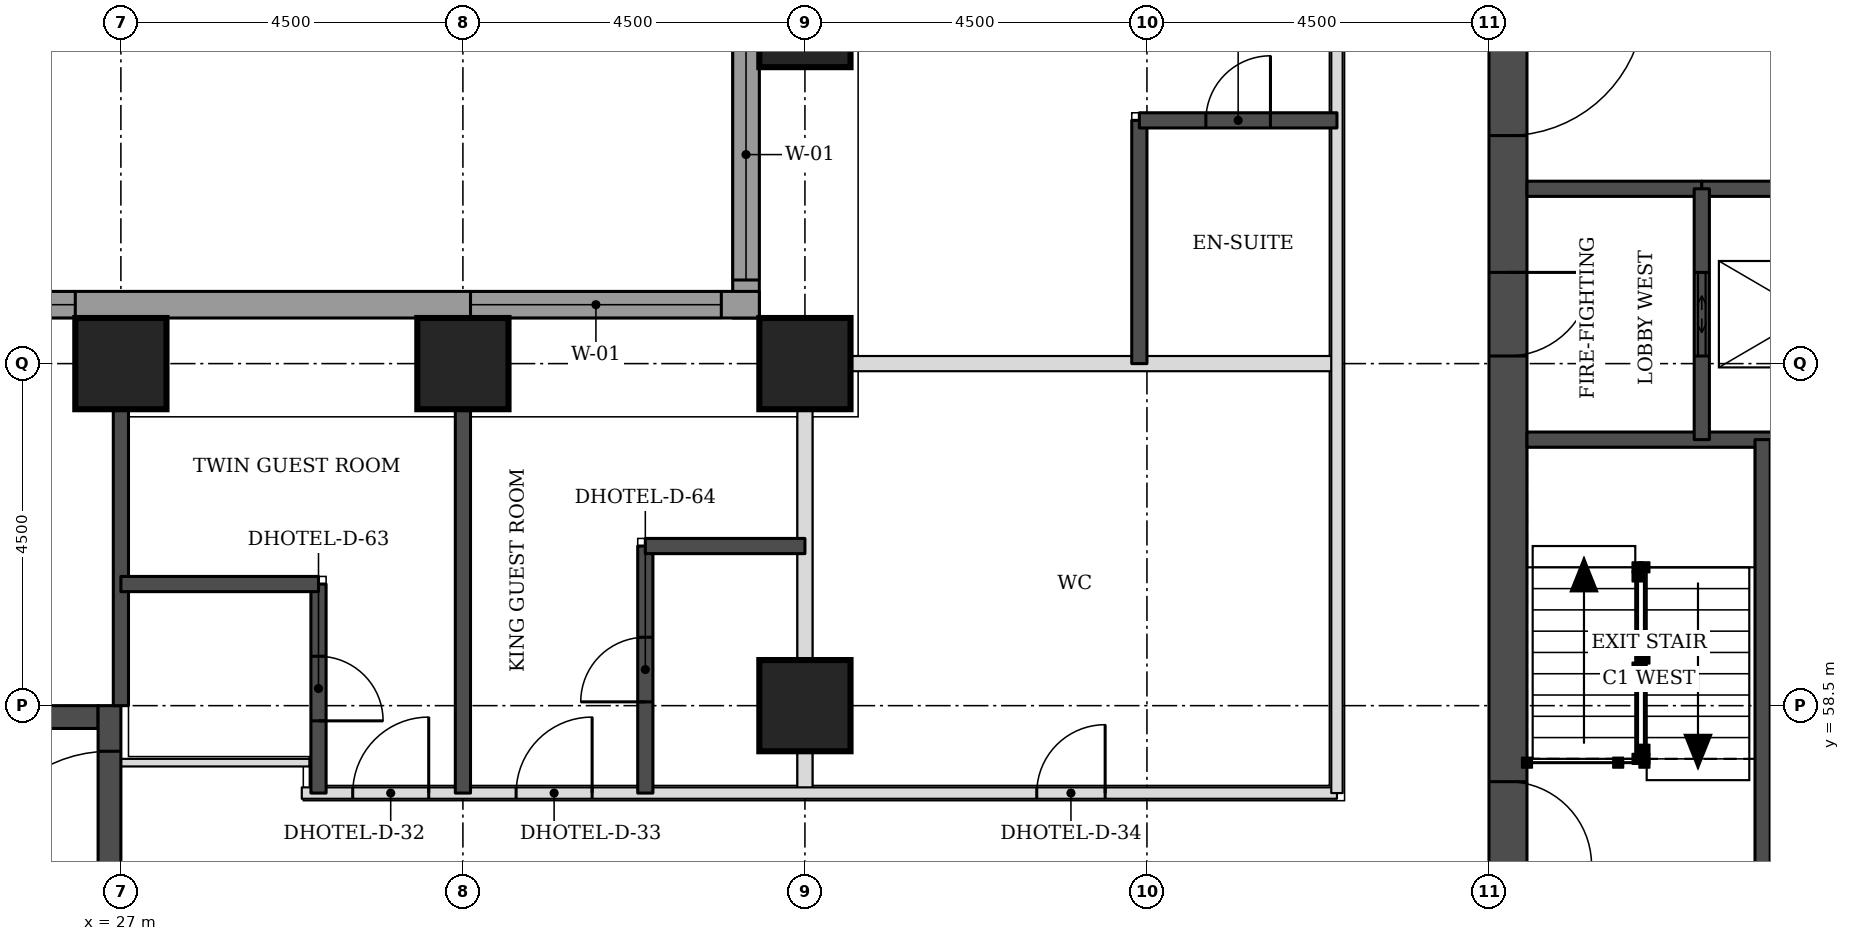
"""IFC4 building model, lengths in metres.
Left out: names, types, materials, properties, quantities, classifications, styles, units other than length and angle.
Written with IfcOpenShell. Run it as: python <this file> out.ifc"""

import sys

from ifc_helpers import new_model, si_unit, direction, frame, frame_2d, origin, origin_2d, place, context, subcontext, project, spatial, rectangle, extrude, element, fill, save


model = new_model("IFC4")
c1 = context("Model", 3, precision=1e-05, world=origin(), true_north=direction((0.0, 1.0)))
c2 = subcontext(c1, "Body", "Model", "MODEL_VIEW")
j1 = project(units=[si_unit("LENGTHUNIT", "METRE"), si_unit("PLANEANGLEUNIT", "RADIAN")], contexts=[c1])
p1 = place(None, origin())
s1 = spatial("IfcSite", under=j1, at=p1, CompositionType="ELEMENT")
p2 = place(p1, origin())
s2 = spatial("IfcBuilding", under=s1, at=p2, CompositionType="ELEMENT")
p3 = place(p2, frame((0.0, 0.0, 36.3)))
s3 = spatial("IfcBuildingStorey", under=s2, at=p3, CompositionType="ELEMENT", Elevation=36.3)
for number, where, z_axis, x_axis in (
    (1, (36.0, 58.5, 0.0), (0.0, 0.0, 1.0), (1.0, 0.0, 0.0)),
    (2, (27.0, 63.0, 0.0), (0.0, 0.0, 1.0), (1.0, 0.0, 0.0)),
    (3, (31.5, 63.0, 0.0), (0.0, 0.0, 1.0), (1.0, 0.0, 0.0)),
    (4, (36.0, 63.0, 0.0), (0.0, 0.0, 1.0), (1.0, 0.0, 0.0)),
    (5, (36.0, 67.5, 0.0), (0.0, 0.0, 1.0), (1.0, 0.0, 0.0)),
):
    element("IfcColumn", number, at=place(p3, frame(where, z_axis=z_axis, x_axis=x_axis)), inside=s3, PredefinedType="COLUMN", context=c2, shape_type="SweptSolid", body=[
        extrude(rectangle(XDim=1.2, YDim=1.2, at=origin_2d()), origin(), (0.0, 0.0, 1.0), 3.3),
    ])
p4 = place(p3, frame((45.25, 49.5, 0.0), z_axis=(0.0, 0.0, 1.0), x_axis=(0.0, 1.0, 0.0)))
e6 = element("IfcWall", 6, at=p4, inside=s3, PredefinedType="SHEAR", context=c2, shape_type="SweptSolid", body=[
    extrude(rectangle(XDim=22.5, YDim=0.5, at=frame_2d((11.25, 0.0))), origin(), (0.0, 0.0, 1.0), 3.3),
])
p5 = place(p4, frame((4.2, 0.0, 0.0)))
e7 = element("IfcOpeningElement", 7, at=p5, cuts=e6, PredefinedType="OPENING", context=c2, shape_type="SweptSolid", body=[
    extrude(rectangle(XDim=1.8, YDim=2.1, at=frame_2d((0.9, 1.05))), frame((0.0, 0.26, 0.0), z_axis=(0.0, -1.0, 0.0), x_axis=(1.0, 0.0, 0.0)), (0.0, 0.0, 1.0), 0.52),
])
p6 = place(p4, frame((6.9, 0.0, 0.0)))
e8 = element("IfcOpeningElement", 8, at=p6, cuts=e6, PredefinedType="OPENING", context=c2, shape_type="SweptSolid", body=[
    extrude(rectangle(XDim=1.1, YDim=2.1, at=frame_2d((0.55, 1.05))), frame((0.0, 0.26, 0.0), z_axis=(0.0, -1.0, 0.0), x_axis=(1.0, 0.0, 0.0)), (0.0, 0.0, 1.0), 0.52),
])
p7 = place(p4, frame((13.6, 0.0, 0.0)))
e9 = element("IfcOpeningElement", 9, at=p7, cuts=e6, PredefinedType="OPENING", context=c2, shape_type="SweptSolid", body=[
    extrude(rectangle(XDim=1.1, YDim=2.1, at=frame_2d((0.55, 1.05))), frame((0.0, 0.26, 0.0), z_axis=(0.0, -1.0, 0.0), x_axis=(1.0, 0.0, 0.0)), (0.0, 0.0, 1.0), 0.52),
])
p8 = place(p4, frame((16.5, 0.0, 0.0)))
e10 = element("IfcOpeningElement", 10, at=p8, cuts=e6, PredefinedType="OPENING", context=c2, shape_type="SweptSolid", body=[
    extrude(rectangle(XDim=1.8, YDim=2.1, at=frame_2d((0.9, 1.05))), frame((0.0, 0.26, 0.0), z_axis=(0.0, -1.0, 0.0), x_axis=(1.0, 0.0, 0.0)), (0.0, 0.0, 1.0), 0.52),
])
p9 = place(p3, frame((18.3, 58.35, 0.0), z_axis=(0.0, 0.0, 1.0), x_axis=(1.0, 0.0, 0.0)))
e11 = element("IfcWall", 11, at=p9, inside=s3, PredefinedType="SHEAR", context=c2, shape_type="SweptSolid", body=[
    extrude(rectangle(XDim=8.4, YDim=0.3, at=frame_2d((4.2, 0.0))), origin(), (0.0, 0.0, 1.0), 3.3),
])
p10 = place(p3, frame((26.85, 49.5, 0.0), z_axis=(0.0, 0.0, 1.0), x_axis=(0.0, 1.0, 0.0)))
e12 = element("IfcWall", 12, at=p10, inside=s3, PredefinedType="SHEAR", context=c2, shape_type="SweptSolid", body=[
    extrude(rectangle(XDim=9.0, YDim=0.3, at=frame_2d((4.5, 0.0))), origin(), (0.0, 0.0, 1.0), 3.3),
])
p11 = place(p10, frame((6.6, 0.0, 0.0)))
e13 = element("IfcOpeningElement", 13, at=p11, cuts=e12, PredefinedType="OPENING", context=c2, shape_type="SweptSolid", body=[
    extrude(rectangle(XDim=1.8, YDim=2.1, at=frame_2d((0.9, 1.05))), frame((0.0, 0.16, 0.0), z_axis=(0.0, -1.0, 0.0), x_axis=(1.0, 0.0, 0.0)), (0.0, 0.0, 1.0), 0.32),
])
p12 = place(p3, frame((35.225, 76.894, 0.0), z_axis=(0.0, 0.0, 1.0), x_axis=(0.0, -1.0, 0.0)))
e14 = element("IfcWall", 14, at=p12, inside=s3, PredefinedType="STANDARD", context=c2, shape_type="SweptSolid", body=[
    extrude(rectangle(XDim=13.293, YDim=0.35, at=frame_2d((6.647, 0.0))), origin(), (0.0, 0.0, 1.0), 3.055),
])
p13 = place(p12, frame((9.493, 0.0, 0.8)))
e15 = element("IfcOpeningElement", 15, at=p13, cuts=e14, PredefinedType="OPENING", context=c2, shape_type="SweptSolid", body=[
    extrude(rectangle(XDim=3.3, YDim=1.5, at=frame_2d((1.65, 0.75))), frame((0.0, 0.185, 0.0), z_axis=(0.0, -1.0, 0.0), x_axis=(1.0, 0.0, 0.0)), (0.0, 0.0, 1.0), 0.37),
])
p14 = place(p3, frame((35.4, 63.775, 0.0), z_axis=(0.0, 0.0, 1.0), x_axis=(-1.0, 0.0, 0.0)))
e16 = element("IfcWall", 16, at=p14, inside=s3, PredefinedType="STANDARD", context=c2, shape_type="SweptSolid", body=[
    extrude(rectangle(XDim=17.793, YDim=0.35, at=frame_2d((8.897, 0.0))), origin(), (0.0, 0.0, 1.0), 3.055),
])
p15 = place(p14, frame((0.5, 0.0, 0.8)))
e17 = element("IfcOpeningElement", 17, at=p15, cuts=e16, PredefinedType="OPENING", context=c2, shape_type="SweptSolid", body=[
    extrude(rectangle(XDim=3.3, YDim=1.5, at=frame_2d((1.65, 0.75))), frame((0.0, 0.185, 0.0), z_axis=(0.0, -1.0, 0.0), x_axis=(1.0, 0.0, 0.0)), (0.0, 0.0, 1.0), 0.37),
])
p16 = place(p14, frame((9.0, 0.0, 0.8)))
e18 = element("IfcOpeningElement", 18, at=p16, cuts=e16, PredefinedType="OPENING", context=c2, shape_type="SweptSolid", body=[
    extrude(rectangle(XDim=3.3, YDim=1.5, at=frame_2d((1.65, 0.75))), frame((0.0, 0.185, 0.0), z_axis=(0.0, -1.0, 0.0), x_axis=(1.0, 0.0, 0.0)), (0.0, 0.0, 1.0), 0.37),
])
p17 = place(p3, frame((36.0, 57.35, 0.0), z_axis=(0.0, 0.0, 1.0), x_axis=(0.0, 1.0, 0.0)))
e19 = element("IfcWall", 19, at=p17, inside=s3, PredefinedType="PARTITIONING", context=c2, shape_type="SweptSolid", body=[
    extrude(rectangle(XDim=5.05, YDim=0.2, at=frame_2d((2.525, 0.0))), origin(), (0.0, 0.0, 1.0), 2.33),
])
p18 = place(p3, frame((36.6, 63.0, 0.0), z_axis=(0.0, 0.0, 1.0), x_axis=(1.0, 0.0, 0.0)))
e20 = element("IfcWall", 20, at=p18, inside=s3, PredefinedType="PARTITIONING", context=c2, shape_type="SweptSolid", body=[
    extrude(rectangle(XDim=6.4, YDim=0.2, at=frame_2d((3.2, 0.0))), origin(), (0.0, 0.0, 1.0), 3.08),
])
p19 = place(p3, frame((29.38, 57.35, 0.0), z_axis=(0.0, 0.0, 1.0), x_axis=(1.0, 0.0, 0.0)))
e21 = element("IfcWall", 21, at=p19, inside=s3, PredefinedType="PARTITIONING", context=c2, shape_type="SweptSolid", body=[
    extrude(rectangle(XDim=13.62, YDim=0.15, at=frame_2d((6.81, 0.0))), origin(), (0.0, 0.0, 1.0), 3.08),
])
p20 = place(p19, frame((2.82, 0.0, 0.0)))
e22 = element("IfcOpeningElement", 22, at=p20, cuts=e21, PredefinedType="OPENING", context=c2, shape_type="SweptSolid", body=[
    extrude(rectangle(XDim=1.0, YDim=2.1, at=frame_2d((0.5, 1.05))), frame((0.0, 0.085, 0.0), z_axis=(0.0, -1.0, 0.0), x_axis=(1.0, 0.0, 0.0)), (0.0, 0.0, 1.0), 0.17),
])
p21 = place(p19, frame((0.67, 0.0, 0.0)))
e23 = element("IfcOpeningElement", 23, at=p21, cuts=e21, PredefinedType="OPENING", context=c2, shape_type="SweptSolid", body=[
    extrude(rectangle(XDim=1.0, YDim=2.1, at=frame_2d((0.5, 1.05))), frame((0.0, 0.085, 0.0), z_axis=(0.0, -1.0, 0.0), x_axis=(1.0, 0.0, 0.0)), (0.0, 0.0, 1.0), 0.17),
])
p22 = place(p19, frame((9.67, 0.0, 0.0)))
e24 = element("IfcOpeningElement", 24, at=p22, cuts=e21, PredefinedType="OPENING", context=c2, shape_type="SweptSolid", body=[
    extrude(rectangle(XDim=0.9, YDim=2.1, at=frame_2d((0.45, 1.05))), frame((0.0, 0.085, 0.0), z_axis=(0.0, -1.0, 0.0), x_axis=(1.0, 0.0, 0.0)), (0.0, 0.0, 1.0), 0.17),
])
p23 = place(p3, frame((43.0, 57.35, 0.0), z_axis=(0.0, 0.0, 1.0), x_axis=(0.0, 1.0, 0.0)))
e25 = element("IfcWall", 25, at=p23, inside=s3, PredefinedType="PARTITIONING", context=c2, shape_type="SweptSolid", body=[
    extrude(rectangle(XDim=16.65, YDim=0.15, at=frame_2d((8.325, 0.0))), origin(), (0.0, 0.0, 1.0), 3.08),
])
p24 = place(p23, frame((11.25, 0.0, 0.0)))
e26 = element("IfcOpeningElement", 26, at=p24, cuts=e25, PredefinedType="OPENING", context=c2, shape_type="SweptSolid", body=[
    extrude(rectangle(XDim=1.0, YDim=2.1, at=frame_2d((0.5, 1.05))), frame((0.0, 0.085, 0.0), z_axis=(0.0, -1.0, 0.0), x_axis=(1.0, 0.0, 0.0)), (0.0, 0.0, 1.0), 0.17),
])
p25 = place(p23, frame((15.203, 0.0, 0.0)))
e27 = element("IfcOpeningElement", 27, at=p25, cuts=e25, PredefinedType="OPENING", context=c2, shape_type="SweptSolid", body=[
    extrude(rectangle(XDim=1.0, YDim=2.1, at=frame_2d((0.5, 1.05))), frame((0.0, 0.085, 0.0), z_axis=(0.0, -1.0, 0.0), x_axis=(1.0, 0.0, 0.0)), (0.0, 0.0, 1.0), 0.17),
])
p26 = place(p3, frame((27.0, 58.5, 0.0), z_axis=(0.0, 0.0, 1.0), x_axis=(0.0, 1.0, 0.0)))
e28 = element("IfcWall", 28, at=p26, inside=s3, PredefinedType="SOLIDWALL", context=c2, shape_type="SweptSolid", body=[
    extrude(rectangle(XDim=3.9, YDim=0.2, at=frame_2d((1.95, 0.0))), origin(), (0.0, 0.0, 1.0), 3.08),
])
p27 = place(p3, frame((29.6, 57.35, 0.0), z_axis=(0.0, 0.0, 1.0), x_axis=(0.0, 1.0, 0.0)))
e29 = element("IfcWall", 29, at=p27, inside=s3, PredefinedType="SOLIDWALL", context=c2, shape_type="SweptSolid", body=[
    extrude(rectangle(XDim=2.75, YDim=0.2, at=frame_2d((1.375, 0.0))), origin(), (0.0, 0.0, 1.0), 3.08),
])
p28 = place(p27, frame((0.95, 0.0, 0.0)))
e30 = element("IfcOpeningElement", 30, at=p28, cuts=e29, PredefinedType="OPENING", context=c2, shape_type="SweptSolid", body=[
    extrude(rectangle(XDim=0.85, YDim=2.1, at=frame_2d((0.425, 1.05))), frame((0.0, 0.11, 0.0), z_axis=(0.0, -1.0, 0.0), x_axis=(1.0, 0.0, 0.0)), (0.0, 0.0, 1.0), 0.22),
])
p29 = place(p3, frame((31.5, 57.35, 0.0), z_axis=(0.0, 0.0, 1.0), x_axis=(0.0, 1.0, 0.0)))
e31 = element("IfcWall", 31, at=p29, inside=s3, PredefinedType="SOLIDWALL", context=c2, shape_type="SweptSolid", body=[
    extrude(rectangle(XDim=5.05, YDim=0.2, at=frame_2d((2.525, 0.0))), origin(), (0.0, 0.0, 1.0), 3.08),
])
p30 = place(p3, frame((33.9, 57.35, 0.0), z_axis=(0.0, 0.0, 1.0), x_axis=(0.0, 1.0, 0.0)))
e32 = element("IfcWall", 32, at=p30, inside=s3, PredefinedType="SOLIDWALL", context=c2, shape_type="SweptSolid", body=[
    extrude(rectangle(XDim=3.25, YDim=0.2, at=frame_2d((1.625, 0.0))), origin(), (0.0, 0.0, 1.0), 3.08),
])
p31 = place(p30, frame((1.2, 0.0, 0.0)))
e33 = element("IfcOpeningElement", 33, at=p31, cuts=e32, PredefinedType="OPENING", context=c2, shape_type="SweptSolid", body=[
    extrude(rectangle(XDim=0.85, YDim=2.1, at=frame_2d((0.425, 1.05))), frame((0.0, 0.11, 0.0), z_axis=(0.0, -1.0, 0.0), x_axis=(1.0, 0.0, 0.0)), (0.0, 0.0, 1.0), 0.22),
])
p32 = place(p3, frame((27.0, 60.1, 0.0), z_axis=(0.0, 0.0, 1.0), x_axis=(1.0, 0.0, 0.0)))
e34 = element("IfcWall", 34, at=p32, inside=s3, PredefinedType="SOLIDWALL", context=c2, shape_type="SweptSolid", body=[
    extrude(rectangle(XDim=2.6, YDim=0.2, at=frame_2d((1.3, 0.0))), origin(), (0.0, 0.0, 1.0), 3.08),
])
p33 = place(p3, frame((33.9, 60.6, 0.0), z_axis=(0.0, 0.0, 1.0), x_axis=(1.0, 0.0, 0.0)))
e35 = element("IfcWall", 35, at=p33, inside=s3, PredefinedType="SOLIDWALL", context=c2, shape_type="SweptSolid", body=[
    extrude(rectangle(XDim=2.1, YDim=0.2, at=frame_2d((1.05, 0.0))), origin(), (0.0, 0.0, 1.0), 3.08),
])
p34 = place(p3, frame((40.4, 63.0, 0.0), z_axis=(0.0, 0.0, 1.0), x_axis=(0.0, 1.0, 0.0)))
e36 = element("IfcWall", 36, at=p34, inside=s3, PredefinedType="SOLIDWALL", context=c2, shape_type="SweptSolid", body=[
    extrude(rectangle(XDim=3.2, YDim=0.2, at=frame_2d((1.6, 0.0))), origin(), (0.0, 0.0, 1.0), 3.08),
])
p35 = place(p3, frame((40.4, 66.2, 0.0), z_axis=(0.0, 0.0, 1.0), x_axis=(1.0, 0.0, 0.0)))
e37 = element("IfcWall", 37, at=p35, inside=s3, PredefinedType="SOLIDWALL", context=c2, shape_type="SweptSolid", body=[
    extrude(rectangle(XDim=2.6, YDim=0.2, at=frame_2d((1.3, 0.0))), origin(), (0.0, 0.0, 1.0), 3.08),
])
p36 = place(p35, frame((0.875, 0.0, 0.0)))
e38 = element("IfcOpeningElement", 38, at=p36, cuts=e37, PredefinedType="OPENING", context=c2, shape_type="SweptSolid", body=[
    extrude(rectangle(XDim=0.85, YDim=2.1, at=frame_2d((0.425, 1.05))), frame((0.0, 0.11, 0.0), z_axis=(0.0, -1.0, 0.0), x_axis=(1.0, 0.0, 0.0)), (0.0, 0.0, 1.0), 0.22),
])
p37 = place(p3, frame((27.0, 57.75, 0.0), z_axis=(0.0, 0.0, 1.0), x_axis=(1.0, 0.0, 0.0)))
e39 = element("IfcWall", 39, at=p37, inside=s3, PredefinedType="PARTITIONING", context=c2, shape_type="SweptSolid", body=[
    extrude(rectangle(XDim=2.48, YDim=0.1, at=frame_2d((1.24, 0.0))), origin(), (0.0, 0.0, 1.0), 3.08),
])
p38 = place(p3, frame((45.5, 62.0, 0.0), z_axis=(0.0, 0.0, 1.0), x_axis=(1.0, 0.0, 0.0)))
e40 = element("IfcWall", 40, at=p38, inside=s3, PredefinedType="SOLIDWALL", context=c2, shape_type="SweptSolid", body=[
    extrude(rectangle(XDim=5.15, YDim=0.2, at=frame_2d((2.575, 0.0))), origin(), (0.0, 0.0, 1.0), 3.08),
])
p39 = place(p3, frame((45.5, 65.3, 0.0), z_axis=(0.0, 0.0, 1.0), x_axis=(1.0, 0.0, 0.0)))
e41 = element("IfcWall", 41, at=p39, inside=s3, PredefinedType="SOLIDWALL", context=c2, shape_type="SweptSolid", body=[
    extrude(rectangle(XDim=2.3, YDim=0.2, at=frame_2d((1.15, 0.0))), origin(), (0.0, 0.0, 1.0), 3.08),
])
p40 = place(p3, frame((47.8, 65.3, 0.0), z_axis=(0.0, 0.0, 1.0), x_axis=(1.0, 0.0, 0.0)))
e42 = element("IfcWall", 42, at=p40, inside=s3, PredefinedType="SOLIDWALL", context=c2, shape_type="SweptSolid", body=[
    extrude(rectangle(XDim=16.9, YDim=0.2, at=frame_2d((8.45, 0.0))), origin(), (0.0, 0.0, 1.0), 3.08),
])
p41 = place(p3, frame((47.8, 62.0, 0.0), z_axis=(0.0, 0.0, 1.0), x_axis=(0.0, 1.0, 0.0)))
e43 = element("IfcWall", 43, at=p41, inside=s3, PredefinedType="SOLIDWALL", context=c2, shape_type="SweptSolid", body=[
    extrude(rectangle(XDim=3.3, YDim=0.2, at=frame_2d((1.65, 0.0))), origin(), (0.0, 0.0, 1.0), 3.08),
])
p42 = place(p41, frame((1.1, 0.0, 0.0)))
e44 = element("IfcOpeningElement", 44, at=p42, cuts=e43, PredefinedType="OPENING", context=c2, shape_type="SweptSolid", body=[
    extrude(rectangle(XDim=1.1, YDim=2.1, at=frame_2d((0.55, 1.05))), frame((0.0, 0.11, 0.0), z_axis=(0.0, -1.0, 0.0), x_axis=(1.0, 0.0, 0.0)), (0.0, 0.0, 1.0), 0.22),
])
p43 = place(p3, frame((48.6, 56.2, 0.0), z_axis=(0.0, 0.0, 1.0), x_axis=(0.0, 1.0, 0.0)))
e45 = element("IfcWall", 45, at=p43, inside=s3, PredefinedType="SOLIDWALL", context=c2, shape_type="SweptSolid", body=[
    extrude(rectangle(XDim=5.8, YDim=0.2, at=frame_2d((2.9, 0.0))), origin(), (0.0, 0.0, 1.0), 3.08),
])
p44 = place(p13, origin())
e46 = element("IfcWindow", 46, at=p44, inside=s3, PartitioningType="SINGLE_PANEL", PredefinedType="WINDOW", context=c2, shape_type="SweptSolid", body=[
    extrude(rectangle(XDim=3.3, YDim=1.5, at=frame_2d((1.65, 0.75))), frame((0.0, 0.085, 0.0), z_axis=(0.0, -1.0, 0.0), x_axis=(1.0, 0.0, 0.0)), (0.0, 0.0, 1.0), 0.06),
])
fill(e15, e46)
p45 = place(p15, origin())
e47 = element("IfcWindow", 47, at=p45, inside=s3, PartitioningType="SINGLE_PANEL", PredefinedType="WINDOW", context=c2, shape_type="SweptSolid", body=[
    extrude(rectangle(XDim=3.3, YDim=1.5, at=frame_2d((1.65, 0.75))), frame((0.0, 0.085, 0.0), z_axis=(0.0, -1.0, 0.0), x_axis=(1.0, 0.0, 0.0)), (0.0, 0.0, 1.0), 0.06),
])
fill(e17, e47)
p46 = place(p16, origin())
e48 = element("IfcWindow", 48, at=p46, inside=s3, PartitioningType="SINGLE_PANEL", PredefinedType="WINDOW", context=c2, shape_type="SweptSolid", body=[
    extrude(rectangle(XDim=3.3, YDim=1.5, at=frame_2d((1.65, 0.75))), frame((0.0, 0.085, 0.0), z_axis=(0.0, -1.0, 0.0), x_axis=(1.0, 0.0, 0.0)), (0.0, 0.0, 1.0), 0.06),
])
fill(e18, e48)
p47 = place(p20, origin())
e49 = element("IfcDoor", 49, at=p47, inside=s3, OperationType="SINGLE_SWING_RIGHT", PredefinedType="DOOR", context=c2, shape_type="SweptSolid", body=[
    extrude(rectangle(XDim=1.0, YDim=2.1, at=frame_2d((0.5, 1.05))), frame((0.0, 0.025, 0.0), z_axis=(0.0, -1.0, 0.0), x_axis=(1.0, 0.0, 0.0)), (0.0, 0.0, 1.0), 0.05),
])
fill(e22, e49)
p48 = place(p31, origin())
e50 = element("IfcDoor", 50, at=p48, inside=s3, OperationType="SINGLE_SWING_LEFT", PredefinedType="DOOR", context=c2, shape_type="SweptSolid", body=[
    extrude(rectangle(XDim=0.85, YDim=2.1, at=frame_2d((0.425, 1.05))), frame((0.0, 0.025, 0.0), z_axis=(0.0, -1.0, 0.0), x_axis=(1.0, 0.0, 0.0)), (0.0, 0.0, 1.0), 0.05),
])
fill(e33, e50)
p49 = place(p21, origin())
e51 = element("IfcDoor", 51, at=p49, inside=s3, OperationType="SINGLE_SWING_RIGHT", PredefinedType="DOOR", context=c2, shape_type="SweptSolid", body=[
    extrude(rectangle(XDim=1.0, YDim=2.1, at=frame_2d((0.5, 1.05))), frame((0.0, 0.025, 0.0), z_axis=(0.0, -1.0, 0.0), x_axis=(1.0, 0.0, 0.0)), (0.0, 0.0, 1.0), 0.05),
])
fill(e23, e51)
p50 = place(p28, frame((0.85, 0.0, 0.0), z_axis=(0.0, 0.0, 1.0), x_axis=(-1.0, 0.0, 0.0)))
e52 = element("IfcDoor", 52, at=p50, inside=s3, OperationType="SINGLE_SWING_RIGHT", PredefinedType="DOOR", context=c2, shape_type="SweptSolid", body=[
    extrude(rectangle(XDim=0.85, YDim=2.1, at=frame_2d((0.425, 1.05))), frame((0.0, 0.025, 0.0), z_axis=(0.0, -1.0, 0.0), x_axis=(1.0, 0.0, 0.0)), (0.0, 0.0, 1.0), 0.05),
])
fill(e30, e52)
p51 = place(p36, origin())
e53 = element("IfcDoor", 53, at=p51, inside=s3, OperationType="SINGLE_SWING_RIGHT", PredefinedType="DOOR", context=c2, shape_type="SweptSolid", body=[
    extrude(rectangle(XDim=0.85, YDim=2.1, at=frame_2d((0.425, 1.05))), frame((0.0, 0.025, 0.0), z_axis=(0.0, -1.0, 0.0), x_axis=(1.0, 0.0, 0.0)), (0.0, 0.0, 1.0), 0.05),
])
fill(e38, e53)
p52 = place(p22, origin())
e54 = element("IfcDoor", 54, at=p52, inside=s3, OperationType="SINGLE_SWING_RIGHT", PredefinedType="DOOR", context=c2, shape_type="SweptSolid", body=[
    extrude(rectangle(XDim=0.9, YDim=2.1, at=frame_2d((0.45, 1.05))), frame((0.0, 0.025, 0.0), z_axis=(0.0, -1.0, 0.0), x_axis=(1.0, 0.0, 0.0)), (0.0, 0.0, 1.0), 0.05),
])
fill(e24, e54)
p53 = place(p42, origin())
e55 = element("IfcDoor", 55, at=p53, inside=s3, OperationType="DOUBLE_DOOR_SLIDING", PredefinedType="DOOR", context=c2, shape_type="SweptSolid", body=[
    extrude(rectangle(XDim=1.1, YDim=2.1, at=frame_2d((0.55, 1.05))), frame((0.0, 0.025, 0.0), z_axis=(0.0, -1.0, 0.0), x_axis=(1.0, 0.0, 0.0)), (0.0, 0.0, 1.0), 0.05),
])
fill(e44, e55)
p54 = place(p6, frame((1.1, 0.0, 0.0), z_axis=(0.0, 0.0, 1.0), x_axis=(-1.0, 0.0, 0.0)))
e56 = element("IfcDoor", 56, at=p54, inside=s3, OperationType="SINGLE_SWING_RIGHT", PredefinedType="DOOR", context=c2, shape_type="SweptSolid", body=[
    extrude(rectangle(XDim=1.1, YDim=2.1, at=frame_2d((0.55, 1.05))), frame((0.0, 0.025, 0.0), z_axis=(0.0, -1.0, 0.0), x_axis=(1.0, 0.0, 0.0)), (0.0, 0.0, 1.0), 0.05),
])
fill(e8, e56)
p55 = place(p7, frame((1.1, 0.0, 0.0), z_axis=(0.0, 0.0, 1.0), x_axis=(-1.0, 0.0, 0.0)))
e57 = element("IfcDoor", 57, at=p55, inside=s3, OperationType="SINGLE_SWING_LEFT", PredefinedType="DOOR", context=c2, shape_type="SweptSolid", body=[
    extrude(rectangle(XDim=1.1, YDim=2.1, at=frame_2d((0.55, 1.05))), frame((0.0, 0.025, 0.0), z_axis=(0.0, -1.0, 0.0), x_axis=(1.0, 0.0, 0.0)), (0.0, 0.0, 1.0), 0.05),
])
fill(e9, e57)
p56 = place(p8, frame((1.8, 0.0, 0.0), z_axis=(0.0, 0.0, 1.0), x_axis=(-1.0, 0.0, 0.0)))
e58 = element("IfcDoor", 58, at=p56, inside=s3, OperationType="SINGLE_SWING_LEFT", PredefinedType="DOOR", context=c2, shape_type="SweptSolid", body=[
    extrude(rectangle(XDim=1.8, YDim=2.1, at=frame_2d((0.9, 1.05))), frame((0.0, 0.025, 0.0), z_axis=(0.0, -1.0, 0.0), x_axis=(1.0, 0.0, 0.0)), (0.0, 0.0, 1.0), 0.05),
])
fill(e10, e58)
p57 = place(p11, origin())
e59 = element("IfcDoor", 59, at=p57, inside=s3, OperationType="SINGLE_SWING_LEFT", PredefinedType="DOOR", context=c2, shape_type="SweptSolid", body=[
    extrude(rectangle(XDim=1.8, YDim=2.1, at=frame_2d((0.9, 1.05))), frame((0.0, 0.025, 0.0), z_axis=(0.0, -1.0, 0.0), x_axis=(1.0, 0.0, 0.0)), (0.0, 0.0, 1.0), 0.05),
])
fill(e13, e59)
save(model, sys.argv[1])
